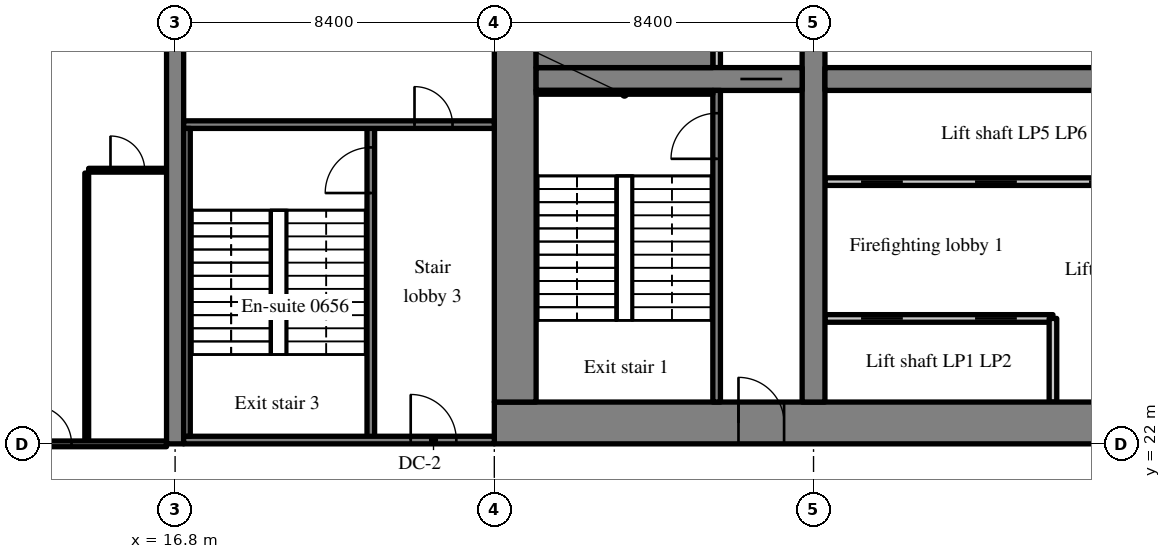
"""IFC4 building model, lengths in metres.
Left out: names, types, materials, properties, quantities, classifications, styles, units other than length and angle.
Written with IfcOpenShell. Run it as: python <this file> out.ifc"""

import sys

from ifc_helpers import new_model, si_unit, direction, frame, frame_2d, origin, place, context, subcontext, project, spatial, rectangle, extrude, source, transform, mapped, element, fill, save


model = new_model("IFC4")
c1 = context("Model", 3, precision=1e-05, world=origin(), true_north=direction((0.0, 1.0)))
c2 = subcontext(c1, "Body", "Model", "MODEL_VIEW")
j1 = project(units=[si_unit("LENGTHUNIT", "METRE"), si_unit("PLANEANGLEUNIT", "RADIAN")], contexts=[c1])
p1 = place(None, origin())
s1 = spatial("IfcSite", under=j1, at=p1, CompositionType="ELEMENT")
p2 = place(p1, origin())
s2 = spatial("IfcBuilding", under=s1, at=p2, CompositionType="ELEMENT")
p3 = place(p2, frame((0.0, 0.0, 31.6)))
s3 = spatial("IfcBuildingStorey", under=s2, at=p3, CompositionType="ELEMENT", Elevation=31.6)
m1 = source(origin(), c2, "Body", "SweptSolid", [
    extrude(rectangle(XDim=50.4, YDim=1.1, at=frame_2d((25.2, 0.0))), origin(), (0.0, 0.0, 1.0), 3.52),
])
p4 = place(p3, frame((25.2, 22.55, 0.0), z_axis=(0.0, 0.0, 1.0), x_axis=(1.0, 0.0, 0.0)))
e1 = element("IfcWall", 1, at=p4, inside=s3, PredefinedType="SHEAR", context=c2, shape_type="MappedRepresentation", body=[
    mapped(m1, transform((0.0, 0.0, 0.0), scale=1.0)),
])
m2 = source(origin(), c2, "Body", "SweptSolid", [
    extrude(rectangle(XDim=1.8, YDim=2.1, at=frame_2d((0.9, 1.05))), frame((0.0, 0.56, 0.0), z_axis=(0.0, -1.0, 0.0), x_axis=(1.0, 0.0, 0.0)), (0.0, 0.0, 1.0), 1.12),
])
p5 = place(p4, frame((15.9, 0.0, 0.0)))
e2 = element("IfcOpeningElement", 2, at=p5, cuts=e1, PredefinedType="OPENING", context=c2, shape_type="MappedRepresentation", body=[
    mapped(m2, transform((0.0, 0.0, 0.0), scale=1.0)),
])
m3 = source(origin(), c2, "Body", "SweptSolid", [
    extrude(rectangle(XDim=1.2, YDim=2.1, at=frame_2d((0.6, 1.05))), frame((0.0, 0.56, 0.0), z_axis=(0.0, -1.0, 0.0), x_axis=(1.0, 0.0, 0.0)), (0.0, 0.0, 1.0), 1.12),
])
p6 = place(p4, frame((27.0, 0.0, 0.0)))
e3 = element("IfcOpeningElement", 3, at=p6, cuts=e1, PredefinedType="OPENING", context=c2, shape_type="MappedRepresentation", body=[
    mapped(m3, transform((0.0, 0.0, 0.0), scale=1.0)),
])
m4 = source(origin(), c2, "Body", "SweptSolid", [
    extrude(rectangle(XDim=0.9, YDim=2.1, at=frame_2d((0.45, 1.05))), frame((0.0, 0.56, 0.0), z_axis=(0.0, -1.0, 0.0), x_axis=(1.0, 0.0, 0.0)), (0.0, 0.0, 1.0), 1.12),
])
p7 = place(p4, frame((32.25, 0.0, 0.0)))
e4 = element("IfcOpeningElement", 4, at=p7, cuts=e1, PredefinedType="OPENING", context=c2, shape_type="MappedRepresentation", body=[
    mapped(m4, transform((0.0, 0.0, 0.0), scale=1.0)),
])
p8 = place(p4, frame((38.25, 0.0, 0.0)))
e5 = element("IfcOpeningElement", 5, at=p8, cuts=e1, PredefinedType="OPENING", context=c2, shape_type="MappedRepresentation", body=[
    mapped(m4, transform((0.0, 0.0, 0.0), scale=1.0)),
])
p9 = place(p4, frame((6.425, 0.0, 0.0)))
e6 = element("IfcOpeningElement", 6, at=p9, cuts=e1, PredefinedType="OPENING", context=c2, shape_type="MappedRepresentation", body=[
    mapped(m3, transform((0.0, 0.0, 0.0), scale=1.0)),
])
p10 = place(p4, frame((47.675, 0.0, 0.0)))
e7 = element("IfcOpeningElement", 7, at=p10, cuts=e1, PredefinedType="OPENING", context=c2, shape_type="MappedRepresentation", body=[
    mapped(m3, transform((0.0, 0.0, 0.0), scale=1.0)),
])
m5 = source(origin(), c2, "Body", "SweptSolid", [
    extrude(rectangle(XDim=17.8, YDim=1.1, at=frame_2d((8.9, 0.0))), origin(), (0.0, 0.0, 1.0), 3.52),
])
p11 = place(p3, frame((25.75, 23.1, 0.0), z_axis=(0.0, 0.0, 1.0), x_axis=(0.0, 1.0, 0.0)))
e8 = element("IfcWall", 8, at=p11, inside=s3, PredefinedType="SHEAR", context=c2, shape_type="MappedRepresentation", body=[
    mapped(m5, transform((0.0, 0.0, 0.0), scale=1.0)),
])
m6 = source(origin(), c2, "Body", "SweptSolid", [
    extrude(rectangle(XDim=17.8, YDim=0.6, at=frame_2d((8.9, 0.0))), origin(), (0.0, 0.0, 1.0), 3.52),
])
p12 = place(p3, frame((33.6, 23.1, 0.0), z_axis=(0.0, 0.0, 1.0), x_axis=(0.0, 1.0, 0.0)))
e9 = element("IfcWall", 9, at=p12, inside=s3, PredefinedType="SHEAR", context=c2, shape_type="MappedRepresentation", body=[
    mapped(m6, transform((0.0, 0.0, 0.0), scale=1.0)),
])
m7 = source(origin(), c2, "Body", "SweptSolid", [
    extrude(rectangle(XDim=1.1, YDim=2.1, at=frame_2d((0.55, 1.05))), frame((0.0, 0.31, 0.0), z_axis=(0.0, -1.0, 0.0), x_axis=(1.0, 0.0, 0.0)), (0.0, 0.0, 1.0), 0.62),
])
p13 = place(p12, frame((12.35, 0.0, 0.0)))
e10 = element("IfcOpeningElement", 10, at=p13, cuts=e9, PredefinedType="OPENING", context=c2, shape_type="MappedRepresentation", body=[
    mapped(m7, transform((0.0, 0.0, 0.0), scale=1.0)),
])
m8 = source(origin(), c2, "Body", "SweptSolid", [
    extrude(rectangle(XDim=7.0, YDim=0.6, at=frame_2d((3.5, 0.0))), origin(), (0.0, 0.0, 1.0), 3.52),
])
p14 = place(p3, frame((26.3, 31.6, 0.0), z_axis=(0.0, 0.0, 1.0), x_axis=(1.0, 0.0, 0.0)))
e11 = element("IfcWall", 11, at=p14, inside=s3, PredefinedType="SHEAR", context=c2, shape_type="MappedRepresentation", body=[
    mapped(m8, transform((0.0, 0.0, 0.0), scale=1.0)),
])
p15 = place(p14, frame((5.375, 0.0, 0.0)))
e12 = element("IfcOpeningElement", 12, at=p15, cuts=e11, PredefinedType="OPENING", context=c2, shape_type="MappedRepresentation", body=[
    mapped(m7, transform((0.0, 0.0, 0.0), scale=1.0)),
])
m9 = source(origin(), c2, "Body", "SweptSolid", [
    extrude(rectangle(XDim=16.2, YDim=0.6, at=frame_2d((8.1, 0.0))), origin(), (0.0, 0.0, 1.0), 3.52),
])
p16 = place(p3, frame((33.9, 31.6, 0.0), z_axis=(0.0, 0.0, 1.0), x_axis=(1.0, 0.0, 0.0)))
e13 = element("IfcWall", 13, at=p16, inside=s3, PredefinedType="SHEAR", context=c2, shape_type="MappedRepresentation", body=[
    mapped(m9, transform((0.0, 0.0, 0.0), scale=1.0)),
])
m10 = source(origin(), c2, "Body", "SweptSolid", [
    extrude(rectangle(XDim=1.0, YDim=2.1, at=frame_2d((0.5, 1.05))), frame((0.0, 0.31, 0.0), z_axis=(0.0, -1.0, 0.0), x_axis=(1.0, 0.0, 0.0)), (0.0, 0.0, 1.0), 0.62),
])
p17 = place(p16, frame((14.65, 0.0, 0.0)))
e14 = element("IfcOpeningElement", 14, at=p17, cuts=e13, PredefinedType="OPENING", context=c2, shape_type="MappedRepresentation", body=[
    mapped(m10, transform((0.0, 0.0, 0.0), scale=1.0)),
])
m11 = source(origin(), c2, "Body", "SweptSolid", [
    extrude(rectangle(XDim=20.0, YDim=0.45, at=frame_2d((10.0, 0.0))), origin(), (0.0, 0.0, 1.0), 3.52),
])
p18 = place(p3, frame((16.8, 22.0, 0.0), z_axis=(0.0, 0.0, 1.0), x_axis=(0.0, 1.0, 0.0)))
e15 = element("IfcWall", 15, at=p18, inside=s3, PredefinedType="SHEAR", context=c2, shape_type="MappedRepresentation", body=[
    mapped(m11, transform((0.0, 0.0, 0.0), scale=1.0)),
])
m12 = source(origin(), c2, "Body", "SweptSolid", [
    extrude(rectangle(XDim=6.0, YDim=0.2, at=frame_2d((3.0, 0.0))), origin(), (0.0, 0.0, 1.0), 3.52),
])
p19 = place(p3, frame((33.9, 25.3, 0.0), z_axis=(0.0, 0.0, 1.0), x_axis=(1.0, 0.0, 0.0)))
e16 = element("IfcWall", 16, at=p19, inside=s3, PredefinedType="SOLIDWALL", context=c2, shape_type="MappedRepresentation", body=[
    mapped(m12, transform((0.0, 0.0, 0.0), scale=1.0)),
])
m13 = source(origin(), c2, "Body", "SweptSolid", [
    extrude(rectangle(XDim=1.1, YDim=2.1, at=frame_2d((0.55, 1.05))), frame((0.0, 0.11, 0.0), z_axis=(0.0, -1.0, 0.0), x_axis=(1.0, 0.0, 0.0)), (0.0, 0.0, 1.0), 0.22),
])
p20 = place(p19, frame((0.95, 0.0, 0.0)))
e17 = element("IfcOpeningElement", 17, at=p20, cuts=e16, PredefinedType="OPENING", context=c2, shape_type="MappedRepresentation", body=[
    mapped(m13, transform((0.0, 0.0, 0.0), scale=1.0)),
])
p21 = place(p19, frame((3.95, 0.0, 0.0)))
e18 = element("IfcOpeningElement", 18, at=p21, cuts=e16, PredefinedType="OPENING", context=c2, shape_type="MappedRepresentation", body=[
    mapped(m13, transform((0.0, 0.0, 0.0), scale=1.0)),
])
m14 = source(origin(), c2, "Body", "SweptSolid", [
    extrude(rectangle(XDim=12.0, YDim=0.2, at=frame_2d((6.0, 0.0))), origin(), (0.0, 0.0, 1.0), 3.52),
])
p22 = place(p3, frame((33.9, 28.9, 0.0), z_axis=(0.0, 0.0, 1.0), x_axis=(1.0, 0.0, 0.0)))
e19 = element("IfcWall", 19, at=p22, inside=s3, PredefinedType="SOLIDWALL", context=c2, shape_type="MappedRepresentation", body=[
    mapped(m14, transform((0.0, 0.0, 0.0), scale=1.0)),
])
p23 = place(p22, frame((0.95, 0.0, 0.0)))
e20 = element("IfcOpeningElement", 20, at=p23, cuts=e19, PredefinedType="OPENING", context=c2, shape_type="MappedRepresentation", body=[
    mapped(m13, transform((0.0, 0.0, 0.0), scale=1.0)),
])
p24 = place(p22, frame((3.95, 0.0, 0.0)))
e21 = element("IfcOpeningElement", 21, at=p24, cuts=e19, PredefinedType="OPENING", context=c2, shape_type="MappedRepresentation", body=[
    mapped(m13, transform((0.0, 0.0, 0.0), scale=1.0)),
])
p25 = place(p22, frame((6.95, 0.0, 0.0)))
e22 = element("IfcOpeningElement", 22, at=p25, cuts=e19, PredefinedType="OPENING", context=c2, shape_type="MappedRepresentation", body=[
    mapped(m13, transform((0.0, 0.0, 0.0), scale=1.0)),
])
p26 = place(p22, frame((9.95, 0.0, 0.0)))
e23 = element("IfcOpeningElement", 23, at=p26, cuts=e19, PredefinedType="OPENING", context=c2, shape_type="MappedRepresentation", body=[
    mapped(m13, transform((0.0, 0.0, 0.0), scale=1.0)),
])
m15 = source(origin(), c2, "Body", "SweptSolid", [
    extrude(rectangle(XDim=2.2, YDim=0.2, at=frame_2d((1.1, 0.0))), origin(), (0.0, 0.0, 1.0), 3.52),
])
p27 = place(p3, frame((39.9, 23.1, 0.0), z_axis=(0.0, 0.0, 1.0), x_axis=(0.0, 1.0, 0.0)))
e24 = element("IfcWall", 24, at=p27, inside=s3, PredefinedType="SOLIDWALL", context=c2, shape_type="MappedRepresentation", body=[
    mapped(m15, transform((0.0, 0.0, 0.0), scale=1.0)),
])
m16 = source(origin(), c2, "Body", "SweptSolid", [
    extrude(rectangle(XDim=8.2, YDim=0.2, at=frame_2d((4.1, 0.0))), origin(), (0.0, 0.0, 1.0), 3.52),
])
p28 = place(p3, frame((31.05, 23.1, 0.0), z_axis=(0.0, 0.0, 1.0), x_axis=(0.0, 1.0, 0.0)))
e25 = element("IfcWall", 25, at=p28, inside=s3, PredefinedType="SOLIDWALL", context=c2, shape_type="MappedRepresentation", body=[
    mapped(m16, transform((0.0, 0.0, 0.0), scale=1.0)),
])
m17 = source(origin(), c2, "Body", "SweptSolid", [
    extrude(rectangle(XDim=1.2, YDim=2.1, at=frame_2d((0.6, 1.05))), frame((0.0, 0.11, 0.0), z_axis=(0.0, -1.0, 0.0), x_axis=(1.0, 0.0, 0.0)), (0.0, 0.0, 1.0), 0.22),
])
p29 = place(p28, frame((6.4, 0.0, 0.0)))
e26 = element("IfcOpeningElement", 26, at=p29, cuts=e25, PredefinedType="OPENING", context=c2, shape_type="MappedRepresentation", body=[
    mapped(m17, transform((0.0, 0.0, 0.0), scale=1.0)),
])
m18 = source(origin(), c2, "Body", "SweptSolid", [
    extrude(rectangle(XDim=1.7, YDim=0.2, at=frame_2d((0.85, 0.0))), origin(), (0.0, 0.0, 1.0), 3.52),
])
p30 = place(p3, frame((31.05, 31.9, 0.0), z_axis=(0.0, 0.0, 1.0), x_axis=(0.0, 1.0, 0.0)))
e27 = element("IfcWall", 27, at=p30, inside=s3, PredefinedType="SOLIDWALL", context=c2, shape_type="MappedRepresentation", body=[
    mapped(m18, transform((0.0, 0.0, 0.0), scale=1.0)),
])
m19 = source(origin(), c2, "Body", "SweptSolid", [
    extrude(rectangle(XDim=8.3, YDim=0.2, at=frame_2d((4.15, 0.0))), origin(), (0.0, 0.0, 1.0), 3.52),
])
p31 = place(p3, frame((21.95, 22.1, 0.0), z_axis=(0.0, 0.0, 1.0), x_axis=(0.0, 1.0, 0.0)))
e28 = element("IfcWall", 28, at=p31, inside=s3, PredefinedType="SOLIDWALL", context=c2, shape_type="MappedRepresentation", body=[
    mapped(m19, transform((0.0, 0.0, 0.0), scale=1.0)),
])
p32 = place(p31, frame((6.5, 0.0, 0.0)))
e29 = element("IfcOpeningElement", 29, at=p32, cuts=e28, PredefinedType="OPENING", context=c2, shape_type="MappedRepresentation", body=[
    mapped(m17, transform((0.0, 0.0, 0.0), scale=1.0)),
])
m20 = source(origin(), c2, "Body", "SweptSolid", [
    extrude(rectangle(XDim=8.175, YDim=0.2, at=frame_2d((4.087, 0.0))), origin(), (0.0, 0.0, 1.0), 3.52),
])
p33 = place(p3, frame((17.025, 22.1, 0.0), z_axis=(0.0, 0.0, 1.0), x_axis=(1.0, 0.0, 0.0)))
e30 = element("IfcWall", 30, at=p33, inside=s3, PredefinedType="SOLIDWALL", context=c2, shape_type="MappedRepresentation", body=[
    mapped(m20, transform((0.0, 0.0, 0.0), scale=1.0)),
])
p34 = place(p33, frame((5.975, 0.0, 0.0)))
e31 = element("IfcOpeningElement", 31, at=p34, cuts=e30, PredefinedType="OPENING", context=c2, shape_type="MappedRepresentation", body=[
    mapped(m17, transform((0.0, 0.0, 0.0), scale=1.0)),
])
p35 = place(p3, frame((17.025, 30.4, 0.0), z_axis=(0.0, 0.0, 1.0), x_axis=(1.0, 0.0, 0.0)))
e32 = element("IfcWall", 32, at=p35, inside=s3, PredefinedType="SOLIDWALL", context=c2, shape_type="MappedRepresentation", body=[
    mapped(m20, transform((0.0, 0.0, 0.0), scale=1.0)),
])
m21 = source(origin(), c2, "Body", "SweptSolid", [
    extrude(rectangle(XDim=1.0, YDim=2.1, at=frame_2d((0.5, 1.05))), frame((0.0, 0.11, 0.0), z_axis=(0.0, -1.0, 0.0), x_axis=(1.0, 0.0, 0.0)), (0.0, 0.0, 1.0), 0.22),
])
p36 = place(p35, frame((6.075, 0.0, 0.0)))
e33 = element("IfcOpeningElement", 33, at=p36, cuts=e32, PredefinedType="OPENING", context=c2, shape_type="MappedRepresentation", body=[
    mapped(m21, transform((0.0, 0.0, 0.0), scale=1.0)),
])
m22 = source(origin(), c2, "Body", "SweptSolid", [
    extrude(rectangle(XDim=4.65, YDim=0.1, at=frame_2d((2.325, 0.0))), origin(), (0.0, 0.0, 1.0), 3.52),
])
p37 = place(p3, frame((26.3, 31.25, 0.0), z_axis=(0.0, 0.0, 1.0), x_axis=(1.0, 0.0, 0.0)))
e34 = element("IfcWall", 34, at=p37, inside=s3, PredefinedType="SOLIDWALL", context=c2, shape_type="MappedRepresentation", body=[
    mapped(m22, transform((0.0, 0.0, 0.0), scale=1.0)),
])
m23 = source(origin(), c2, "Body", "SweptSolid", [
    extrude(rectangle(XDim=8.1, YDim=0.175, at=frame_2d((4.05, 0.0))), origin(), (0.0, 0.0, 1.0), 3.52),
])
p38 = place(p3, frame((17.112, 22.2, 0.0), z_axis=(0.0, 0.0, 1.0), x_axis=(0.0, 1.0, 0.0)))
e35 = element("IfcWall", 35, at=p38, inside=s3, PredefinedType="SOLIDWALL", context=c2, shape_type="MappedRepresentation", body=[
    mapped(m23, transform((0.0, 0.0, 0.0), scale=1.0)),
])
m24 = source(origin(), c2, "Body", "SweptSolid", [
    extrude(rectangle(XDim=4.65, YDim=0.9, at=frame_2d((2.325, 0.0))), origin(), (0.0, 0.0, 1.0), 3.52),
])
p39 = place(p3, frame((26.3, 32.35, 0.0), z_axis=(0.0, 0.0, 1.0), x_axis=(1.0, 0.0, 0.0)))
e36 = element("IfcWall", 36, at=p39, inside=s3, PredefinedType="SOLIDWALL", context=c2, shape_type="MappedRepresentation", body=[
    mapped(m24, transform((0.0, 0.0, 0.0), scale=1.0)),
])
m25 = source(origin(), c2, "Body", "SweptSolid", [
    extrude(rectangle(XDim=7.05, YDim=0.1, at=frame_2d((3.525, 0.0))), origin(), (0.0, 0.0, 1.0), 3.52),
])
p40 = place(p3, frame((14.475, 22.075, 0.0), z_axis=(0.0, 0.0, 1.0), x_axis=(0.0, 1.0, 0.0)))
e37 = element("IfcWall", 37, at=p40, inside=s3, PredefinedType="PARTITIONING", context=c2, shape_type="MappedRepresentation", body=[
    mapped(m25, transform((0.0, 0.0, 0.0), scale=1.0)),
])
m26 = source(origin(), c2, "Body", "SweptSolid", [
    extrude(rectangle(XDim=2.05, YDim=0.1, at=frame_2d((1.025, 0.0))), origin(), (0.0, 0.0, 1.0), 3.52),
])
p41 = place(p3, frame((14.525, 29.2, 0.0), z_axis=(0.0, 0.0, 1.0), x_axis=(1.0, 0.0, 0.0)))
e38 = element("IfcWall", 38, at=p41, inside=s3, PredefinedType="PARTITIONING", context=c2, shape_type="MappedRepresentation", body=[
    mapped(m26, transform((0.0, 0.0, 0.0), scale=1.0)),
])
m27 = source(origin(), c2, "Body", "SweptSolid", [
    extrude(rectangle(XDim=0.9, YDim=2.1, at=frame_2d((0.45, 1.05))), frame((0.0, 0.06, 0.0), z_axis=(0.0, -1.0, 0.0), x_axis=(1.0, 0.0, 0.0)), (0.0, 0.0, 1.0), 0.12),
])
p42 = place(p41, frame((0.575, 0.0, 0.0)))
e39 = element("IfcOpeningElement", 39, at=p42, cuts=e38, PredefinedType="OPENING", context=c2, shape_type="MappedRepresentation", body=[
    mapped(m27, transform((0.0, 0.0, 0.0), scale=1.0)),
])
m28 = source(origin(), c2, "Body", "SweptSolid", [
    extrude(rectangle(XDim=3.9, YDim=0.15, at=frame_2d((1.95, 0.0))), origin(), (0.0, 0.0, 1.0), 2.82),
])
p43 = place(p3, frame((12.675, 22.0, 0.0), z_axis=(0.0, 0.0, 1.0), x_axis=(1.0, 0.0, 0.0)))
e40 = element("IfcWall", 40, at=p43, inside=s3, PredefinedType="PARTITIONING", context=c2, shape_type="MappedRepresentation", body=[
    mapped(m28, transform((0.0, 0.0, 0.0), scale=1.0)),
])
m29 = source(origin(), c2, "Body", "SweptSolid", [
    extrude(rectangle(XDim=1.0, YDim=2.1, at=frame_2d((0.5, 1.05))), frame((0.0, 0.085, 0.0), z_axis=(0.0, -1.0, 0.0), x_axis=(1.0, 0.0, 0.0)), (0.0, 0.0, 1.0), 0.17),
])
p44 = place(p43, frame((0.4, 0.0, 0.0)))
e41 = element("IfcOpeningElement", 41, at=p44, cuts=e40, PredefinedType="OPENING", context=c2, shape_type="MappedRepresentation", body=[
    mapped(m29, transform((0.0, 0.0, 0.0), scale=1.0)),
])
m30 = source(origin(), c2, "Body", "SweptSolid", [
    extrude(rectangle(XDim=1.1, YDim=2.1, at=frame_2d((0.55, 1.05))), frame((0.0, 0.025, 0.0), z_axis=(0.0, -1.0, 0.0), x_axis=(1.0, 0.0, 0.0)), (0.0, 0.0, 1.0), 0.05),
])
p45 = place(p20, origin())
e42 = element("IfcDoor", 42, at=p45, inside=s3, OperationType="SLIDING_TO_LEFT", PredefinedType="DOOR", context=c2, shape_type="MappedRepresentation", body=[
    mapped(m30, transform((0.0, 0.0, 0.0), scale=1.0)),
])
fill(e17, e42)
p46 = place(p21, origin())
e43 = element("IfcDoor", 43, at=p46, inside=s3, OperationType="SLIDING_TO_RIGHT", PredefinedType="DOOR", context=c2, shape_type="MappedRepresentation", body=[
    mapped(m30, transform((0.0, 0.0, 0.0), scale=1.0)),
])
fill(e18, e43)
p47 = place(p23, origin())
e44 = element("IfcDoor", 44, at=p47, inside=s3, OperationType="SLIDING_TO_LEFT", PredefinedType="DOOR", context=c2, shape_type="MappedRepresentation", body=[
    mapped(m30, transform((0.0, 0.0, 0.0), scale=1.0)),
])
fill(e20, e44)
p48 = place(p24, origin())
e45 = element("IfcDoor", 45, at=p48, inside=s3, OperationType="SLIDING_TO_RIGHT", PredefinedType="DOOR", context=c2, shape_type="MappedRepresentation", body=[
    mapped(m30, transform((0.0, 0.0, 0.0), scale=1.0)),
])
fill(e21, e45)
p49 = place(p25, origin())
e46 = element("IfcDoor", 46, at=p49, inside=s3, OperationType="SLIDING_TO_LEFT", PredefinedType="DOOR", context=c2, shape_type="MappedRepresentation", body=[
    mapped(m30, transform((0.0, 0.0, 0.0), scale=1.0)),
])
fill(e22, e46)
m31 = source(origin(), c2, "Body", "SweptSolid", [
    extrude(rectangle(XDim=1.2, YDim=2.1, at=frame_2d((0.6, 1.05))), frame((0.0, 0.025, 0.0), z_axis=(0.0, -1.0, 0.0), x_axis=(1.0, 0.0, 0.0)), (0.0, 0.0, 1.0), 0.05),
])
p50 = place(p29, origin())
e47 = element("IfcDoor", 47, at=p50, inside=s3, OperationType="SINGLE_SWING_LEFT", PredefinedType="DOOR", context=c2, shape_type="MappedRepresentation", body=[
    mapped(m31, transform((0.0, 0.0, 0.0), scale=1.0)),
])
fill(e26, e47)
m32 = source(origin(), c2, "Body", "SweptSolid", [
    extrude(rectangle(XDim=1.2, YDim=2.1, at=frame_2d((0.6, 1.05))), frame((0.0, 0.325, 0.0), z_axis=(0.0, -1.0, 0.0), x_axis=(1.0, 0.0, 0.0)), (0.0, 0.0, 1.0), 0.05),
])
p51 = place(p9, origin())
e48 = element("IfcDoor", 48, at=p51, inside=s3, OperationType="SINGLE_SWING_LEFT", PredefinedType="DOOR", context=c2, shape_type="MappedRepresentation", body=[
    mapped(m32, transform((0.0, 0.0, 0.0), scale=1.0)),
])
fill(e6, e48)
p52 = place(p15, origin())
e49 = element("IfcDoor", 49, at=p52, inside=s3, OperationType="SLIDING_TO_RIGHT", PredefinedType="DOOR", context=c2, shape_type="MappedRepresentation", body=[
    mapped(m30, transform((0.0, 0.0, 0.0), scale=1.0)),
])
fill(e12, e49)
p53 = place(p32, origin())
e50 = element("IfcDoor", 50, at=p53, inside=s3, OperationType="SINGLE_SWING_LEFT", PredefinedType="DOOR", context=c2, shape_type="MappedRepresentation", body=[
    mapped(m31, transform((0.0, 0.0, 0.0), scale=1.0)),
])
fill(e29, e50)
p54 = place(p34, origin())
e51 = element("IfcDoor", 51, at=p54, inside=s3, OperationType="SINGLE_SWING_LEFT", PredefinedType="DOOR", context=c2, shape_type="MappedRepresentation", body=[
    mapped(m31, transform((0.0, 0.0, 0.0), scale=1.0)),
])
fill(e31, e51)
m33 = source(origin(), c2, "Body", "SweptSolid", [
    extrude(rectangle(XDim=1.0, YDim=2.1, at=frame_2d((0.5, 1.05))), frame((0.0, 0.025, 0.0), z_axis=(0.0, -1.0, 0.0), x_axis=(1.0, 0.0, 0.0)), (0.0, 0.0, 1.0), 0.05),
])
p55 = place(p36, origin())
e52 = element("IfcDoor", 52, at=p55, inside=s3, OperationType="SINGLE_SWING_LEFT", PredefinedType="DOOR", context=c2, shape_type="MappedRepresentation", body=[
    mapped(m33, transform((0.0, 0.0, 0.0), scale=1.0)),
])
fill(e33, e52)
m34 = source(origin(), c2, "Body", "SweptSolid", [
    extrude(rectangle(XDim=0.9, YDim=2.1, at=frame_2d((0.45, 1.05))), frame((0.0, 0.025, 0.0), z_axis=(0.0, -1.0, 0.0), x_axis=(1.0, 0.0, 0.0)), (0.0, 0.0, 1.0), 0.05),
])
p56 = place(p42, origin())
e53 = element("IfcDoor", 53, at=p56, inside=s3, OperationType="SINGLE_SWING_LEFT", PredefinedType="DOOR", context=c2, shape_type="MappedRepresentation", body=[
    mapped(m34, transform((0.0, 0.0, 0.0), scale=1.0)),
])
fill(e39, e53)
p57 = place(p44, origin())
e54 = element("IfcDoor", 54, at=p57, inside=s3, OperationType="SINGLE_SWING_LEFT", PredefinedType="DOOR", context=c2, shape_type="MappedRepresentation", body=[
    mapped(m33, transform((0.0, 0.0, 0.0), scale=1.0)),
])
fill(e41, e54)
save(model, sys.argv[1])
